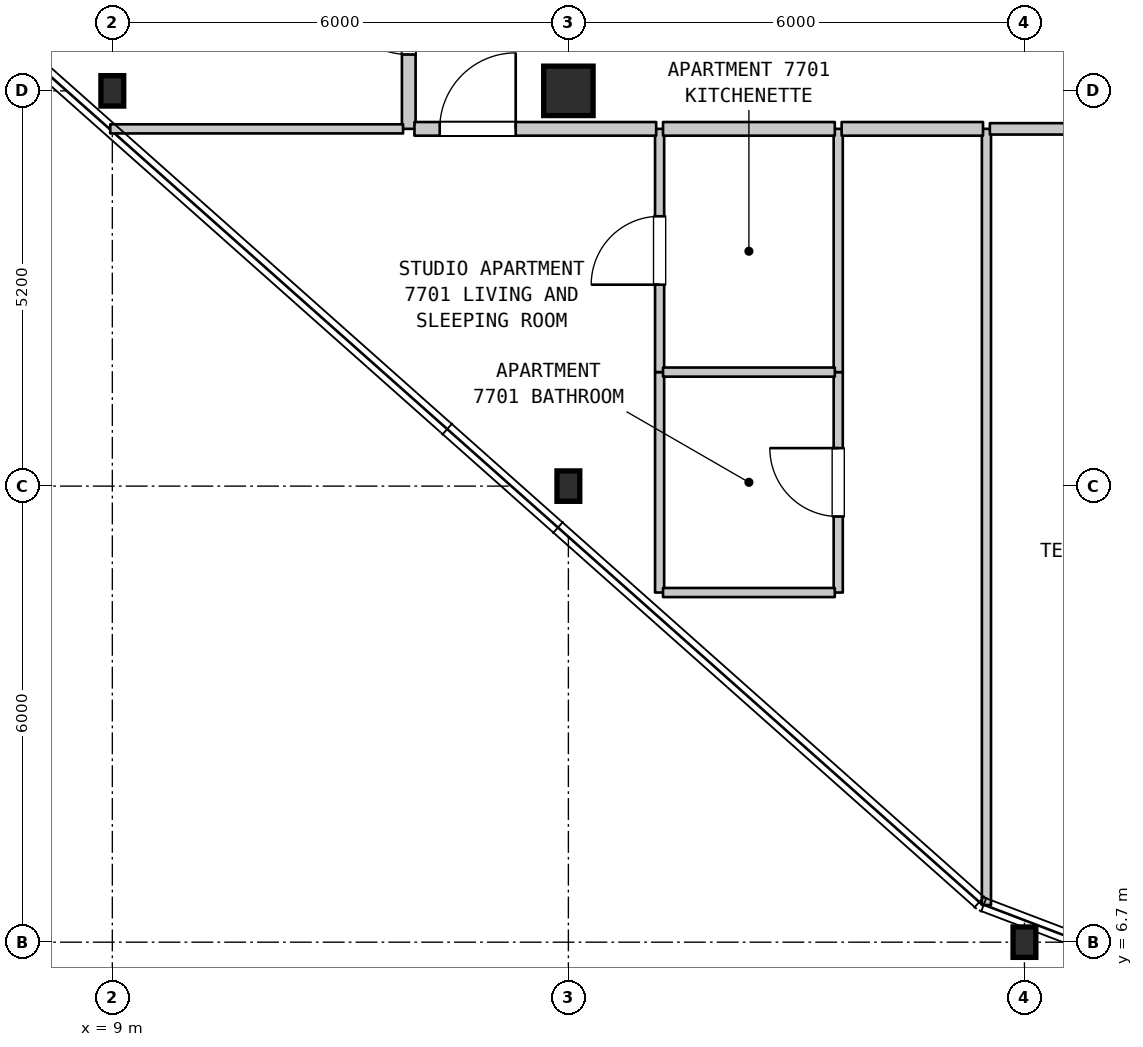
"""IFC4 building model, lengths in metres.
Left out: names, types, materials, properties, quantities, classifications, styles, units other than length and angle.
Written with IfcOpenShell. Run it as: python <this file> out.ifc"""

import sys

from ifc_helpers import new_model, si_unit, direction, frame, frame_2d, origin, origin_2d, place, context, subcontext, project, spatial, rectangle, i_section, extrude, element, fill, save


model = new_model("IFC4")
c1 = context("Model", 3, precision=1e-05, world=origin(), true_north=direction((0.0, 1.0)))
c2 = subcontext(c1, "Body", "Model", "MODEL_VIEW")
j1 = project(units=[si_unit("LENGTHUNIT", "METRE"), si_unit("PLANEANGLEUNIT", "RADIAN")], contexts=[c1])
p1 = place(None, origin())
s1 = spatial("IfcSite", under=j1, at=p1, CompositionType="ELEMENT")
p2 = place(p1, origin())
s2 = spatial("IfcBuilding", under=s1, at=p2, CompositionType="ELEMENT")
p3 = place(p2, frame((0.0, 0.0, 307.3)))
s3 = spatial("IfcBuildingStorey", under=s2, at=p3, CompositionType="ELEMENT", Elevation=307.3)
for number, where, z_axis, x_axis in (
    (1, (9.0, 17.9, 0.0), (0.0, 0.0, 1.0), (1.0, 0.0, 0.0)),
    (2, (15.0, 12.7, 0.0), (0.0, 0.0, 1.0), (1.0, 0.0, 0.0)),
):
    element("IfcColumn", number, at=place(p3, frame(where, z_axis=z_axis, x_axis=x_axis)), inside=s3, PredefinedType="COLUMN", context=c2, shape_type="SweptSolid", body=[
        extrude(i_section(OverallWidth=0.3, OverallDepth=0.4, WebThickness=0.013, FlangeThickness=0.024, FilletRadius=0.027, at=origin_2d()), origin(), (0.0, 0.0, 1.0), 3.7),
    ])
p4 = place(p3, frame((15.0, 17.9, 0.0), z_axis=(0.0, 0.0, 1.0), x_axis=(1.0, 0.0, 0.0)))
e3 = element("IfcColumn", 3, at=p4, inside=s3, PredefinedType="COLUMN", context=c2, shape_type="SweptSolid", body=[
    extrude(rectangle(XDim=0.65, YDim=0.65, at=origin_2d()), origin(), (0.0, 0.0, 1.0), 3.7),
])
p5 = place(p3, frame((21.0, 6.7, 0.0), z_axis=(0.0, 0.0, 1.0), x_axis=(1.0, 0.0, 0.0)))
e4 = element("IfcColumn", 4, at=p5, inside=s3, PredefinedType="COLUMN", context=c2, shape_type="SweptSolid", body=[
    extrude(i_section(OverallWidth=0.3, OverallDepth=0.4, WebThickness=0.013, FlangeThickness=0.024, FilletRadius=0.027, at=origin_2d()), origin(), (0.0, 0.0, 1.0), 3.7),
])
p6 = place(p3, frame((12.9, 17.4, 0.0), z_axis=(0.0, 0.0, 1.0), x_axis=(0.0, 1.0, 0.0)))
e5 = element("IfcWall", 5, at=p6, inside=s3, PredefinedType="STANDARD", context=c2, shape_type="SweptSolid", body=[
    extrude(rectangle(XDim=3.1, YDim=0.18, at=frame_2d((1.55, 0.0))), origin(), (0.0, 0.0, 1.0), 3.39),
])
p7 = place(p6, frame((0.978, 0.0, 0.0)))
e6 = element("IfcOpeningElement", 6, at=p7, cuts=e5, PredefinedType="OPENING", context=c2, shape_type="SweptSolid", body=[
    extrude(rectangle(XDim=1.0, YDim=2.15, at=frame_2d((0.5, 1.075))), frame((0.0, 0.1, 0.0), z_axis=(0.0, -1.0, 0.0), x_axis=(1.0, 0.0, 0.0)), (0.0, 0.0, 1.0), 0.2),
])
p8 = place(p3, frame((16.2, 11.3, 0.0), z_axis=(0.0, 0.0, 1.0), x_axis=(0.0, 1.0, 0.0)))
e7 = element("IfcWall", 7, at=p8, inside=s3, PredefinedType="PARTITIONING", context=c2, shape_type="SweptSolid", body=[
    extrude(rectangle(XDim=2.9, YDim=0.12, at=frame_2d((1.45, 0.0))), origin(), (0.0, 0.0, 1.0), 3.39),
])
p9 = place(p3, frame((16.2, 14.2, 0.0), z_axis=(0.0, 0.0, 1.0), x_axis=(0.0, 1.0, 0.0)))
e8 = element("IfcWall", 8, at=p9, inside=s3, PredefinedType="PARTITIONING", context=c2, shape_type="SweptSolid", body=[
    extrude(rectangle(XDim=3.2, YDim=0.12, at=frame_2d((1.6, 0.0))), origin(), (0.0, 0.0, 1.0), 3.39),
])
p10 = place(p9, frame((1.15, 0.0, 0.0)))
e9 = element("IfcOpeningElement", 9, at=p10, cuts=e8, PredefinedType="OPENING", context=c2, shape_type="SweptSolid", body=[
    extrude(rectangle(XDim=0.9, YDim=2.15, at=frame_2d((0.45, 1.075))), frame((0.0, 0.07, 0.0), z_axis=(0.0, -1.0, 0.0), x_axis=(1.0, 0.0, 0.0)), (0.0, 0.0, 1.0), 0.14),
])
p11 = place(p3, frame((18.55, 11.3, 0.0), z_axis=(0.0, 0.0, 1.0), x_axis=(0.0, 1.0, 0.0)))
e10 = element("IfcWall", 10, at=p11, inside=s3, PredefinedType="PARTITIONING", context=c2, shape_type="SweptSolid", body=[
    extrude(rectangle(XDim=2.9, YDim=0.12, at=frame_2d((1.45, 0.0))), origin(), (0.0, 0.0, 1.0), 3.39),
])
p12 = place(p11, frame((1.0, 0.0, 0.0)))
e11 = element("IfcOpeningElement", 11, at=p12, cuts=e10, PredefinedType="OPENING", context=c2, shape_type="SweptSolid", body=[
    extrude(rectangle(XDim=0.9, YDim=2.1, at=frame_2d((0.45, 1.05))), frame((0.0, 0.07, 0.0), z_axis=(0.0, -1.0, 0.0), x_axis=(1.0, 0.0, 0.0)), (0.0, 0.0, 1.0), 0.14),
])
p13 = place(p3, frame((18.55, 14.2, 0.0), z_axis=(0.0, 0.0, 1.0), x_axis=(0.0, 1.0, 0.0)))
e12 = element("IfcWall", 12, at=p13, inside=s3, PredefinedType="PARTITIONING", context=c2, shape_type="SweptSolid", body=[
    extrude(rectangle(XDim=3.2, YDim=0.12, at=frame_2d((1.6, 0.0))), origin(), (0.0, 0.0, 1.0), 3.39),
])
p14 = place(p3, frame((20.5, 7.189, 0.0), z_axis=(0.0, 0.0, 1.0), x_axis=(0.0, 1.0, 0.0)))
e13 = element("IfcWall", 13, at=p14, inside=s3, PredefinedType="PARTITIONING", context=c2, shape_type="SweptSolid", body=[
    extrude(rectangle(XDim=10.211, YDim=0.12, at=frame_2d((5.105, 0.0))), origin(), (0.0, 0.0, 1.0), 3.39),
])
for number, where, z_axis, x_axis in (
    (14, (16.245, 11.3, 0.0), (0.0, 0.0, 1.0), (1.0, 0.0, 0.0)),
    (15, (16.245, 14.2, 0.0), (0.0, 0.0, 1.0), (1.0, 0.0, 0.0)),
):
    element("IfcWall", number, at=place(p3, frame(where, z_axis=z_axis, x_axis=x_axis)), inside=s3, PredefinedType="PARTITIONING", context=c2, shape_type="SweptSolid", body=[
        extrude(rectangle(XDim=2.26, YDim=0.12, at=frame_2d((1.13, 0.0))), origin(), (0.0, 0.0, 1.0), 3.39),
    ])
p15 = place(p3, frame((8.973, 17.4, 0.0), z_axis=(0.0, 0.0, 1.0), x_axis=(1.0, 0.0, 0.0)))
e16 = element("IfcWall", 16, at=p15, inside=s3, PredefinedType="PARTITIONING", context=c2, shape_type="SweptSolid", body=[
    extrude(rectangle(XDim=3.852, YDim=0.12, at=frame_2d((1.926, 0.0))), origin(), (0.0, 0.0, 1.0), 3.39),
])
p16 = place(p3, frame((12.975, 17.4, 0.0), z_axis=(0.0, 0.0, 1.0), x_axis=(1.0, 0.0, 0.0)))
e17 = element("IfcWall", 17, at=p16, inside=s3, PredefinedType="STANDARD", context=c2, shape_type="SweptSolid", body=[
    extrude(rectangle(XDim=3.18, YDim=0.18, at=frame_2d((1.59, 0.0))), origin(), (0.0, 0.0, 1.0), 3.39),
])
p17 = place(p16, frame((0.332, 0.0, 0.0)))
e18 = element("IfcOpeningElement", 18, at=p17, cuts=e17, PredefinedType="OPENING", context=c2, shape_type="SweptSolid", body=[
    extrude(rectangle(XDim=1.0, YDim=2.15, at=frame_2d((0.5, 1.075))), frame((0.0, 0.1, 0.0), z_axis=(0.0, -1.0, 0.0), x_axis=(1.0, 0.0, 0.0)), (0.0, 0.0, 1.0), 0.2),
])
p18 = place(p3, frame((16.245, 17.4, 0.0), z_axis=(0.0, 0.0, 1.0), x_axis=(1.0, 0.0, 0.0)))
e19 = element("IfcWall", 19, at=p18, inside=s3, PredefinedType="STANDARD", context=c2, shape_type="SweptSolid", body=[
    extrude(rectangle(XDim=2.26, YDim=0.18, at=frame_2d((1.13, 0.0))), origin(), (0.0, 0.0, 1.0), 3.39),
])
p19 = place(p3, frame((18.595, 17.4, 0.0), z_axis=(0.0, 0.0, 1.0), x_axis=(1.0, 0.0, 0.0)))
e20 = element("IfcWall", 20, at=p19, inside=s3, PredefinedType="STANDARD", context=c2, shape_type="SweptSolid", body=[
    extrude(rectangle(XDim=1.86, YDim=0.18, at=frame_2d((0.93, 0.0))), origin(), (0.0, 0.0, 1.0), 3.39),
])
p20 = place(p3, frame((20.545, 17.4, 0.0), z_axis=(0.0, 0.0, 1.0), x_axis=(1.0, 0.0, 0.0)))
e21 = element("IfcWall", 21, at=p20, inside=s3, PredefinedType="STANDARD", context=c2, shape_type="SweptSolid", body=[
    extrude(rectangle(XDim=3.61, YDim=0.15, at=frame_2d((1.805, 0.0))), origin(), (0.0, 0.0, 1.0), 3.39),
])
p21 = place(p20, frame((1.305, 0.0, 0.0)))
e22 = element("IfcOpeningElement", 22, at=p21, cuts=e21, PredefinedType="OPENING", context=c2, shape_type="SweptSolid", body=[
    extrude(rectangle(XDim=1.0, YDim=2.15, at=frame_2d((0.5, 1.075))), frame((0.0, 0.085, 0.0), z_axis=(0.0, -1.0, 0.0), x_axis=(1.0, 0.0, 0.0)), (0.0, 0.0, 1.0), 0.17),
])
p22 = place(p7, origin())
e23 = element("IfcDoor", 23, at=p22, inside=s3, OperationType="SINGLE_SWING_RIGHT", PredefinedType="DOOR", context=c2, shape_type="SweptSolid", body=[
    extrude(rectangle(XDim=1.0, YDim=2.15, at=frame_2d((0.5, 1.075))), frame((0.0, 0.025, 0.0), z_axis=(0.0, -1.0, 0.0), x_axis=(1.0, 0.0, 0.0)), (0.0, 0.0, 1.0), 0.05),
])
fill(e6, e23)
p23 = place(p10, origin())
e24 = element("IfcDoor", 24, at=p23, inside=s3, OperationType="SINGLE_SWING_LEFT", PredefinedType="DOOR", context=c2, shape_type="SweptSolid", body=[
    extrude(rectangle(XDim=0.9, YDim=2.15, at=frame_2d((0.45, 1.075))), frame((0.0, 0.025, 0.0), z_axis=(0.0, -1.0, 0.0), x_axis=(1.0, 0.0, 0.0)), (0.0, 0.0, 1.0), 0.05),
])
fill(e9, e24)
p24 = place(p12, origin())
e25 = element("IfcDoor", 25, at=p24, inside=s3, OperationType="SINGLE_SWING_RIGHT", PredefinedType="DOOR", context=c2, shape_type="SweptSolid", body=[
    extrude(rectangle(XDim=0.9, YDim=2.1, at=frame_2d((0.45, 1.05))), frame((0.0, 0.025, 0.0), z_axis=(0.0, -1.0, 0.0), x_axis=(1.0, 0.0, 0.0)), (0.0, 0.0, 1.0), 0.05),
])
fill(e11, e25)
p25 = place(p17, origin())
e26 = element("IfcDoor", 26, at=p25, inside=s3, OperationType="SINGLE_SWING_RIGHT", PredefinedType="DOOR", context=c2, shape_type="SweptSolid", body=[
    extrude(rectangle(XDim=1.0, YDim=2.15, at=frame_2d((0.5, 1.075))), frame((0.0, 0.025, 0.0), z_axis=(0.0, -1.0, 0.0), x_axis=(1.0, 0.0, 0.0)), (0.0, 0.0, 1.0), 0.05),
])
fill(e18, e26)
save(model, sys.argv[1])
